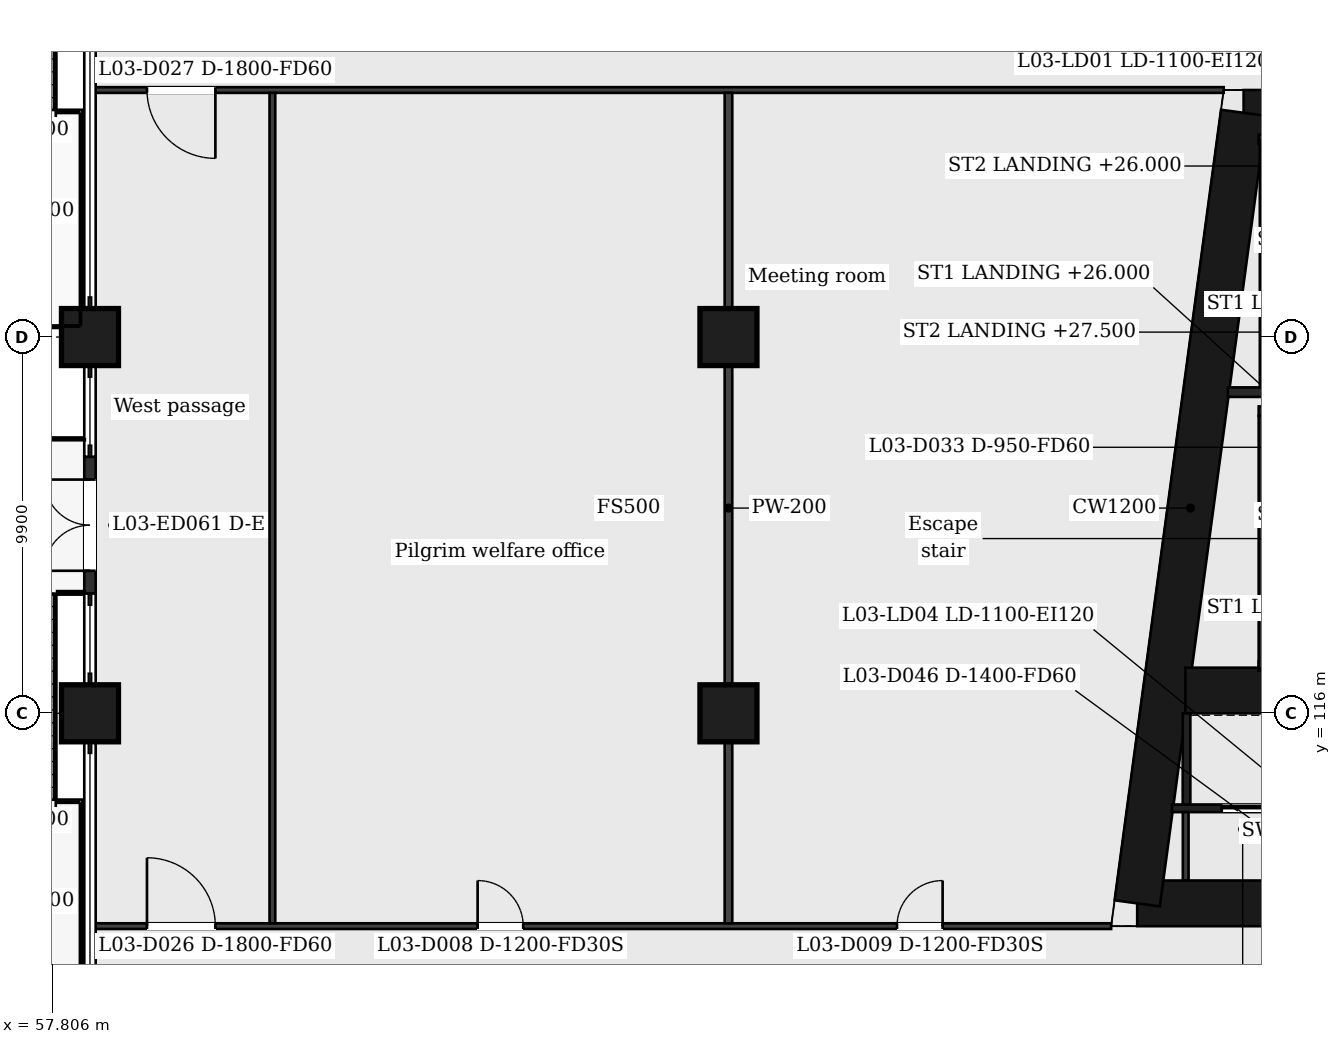
"""IFC4 building model, lengths in metres.
Left out: names, types, materials, properties, quantities, classifications, styles, units other than length and angle.
Written with IfcOpenShell. Run it as: python <this file> out.ifc"""

import sys

from ifc_helpers import new_model, si_unit, direction, frame, frame_2d, origin, origin_2d, place, context, subcontext, project, spatial, rectangle, extrude, element, fill, save


model = new_model("IFC4")
c1 = context("Model", 3, precision=1e-05, world=origin(), true_north=direction((0.0, 1.0)))
c2 = subcontext(c1, "Body", "Model", "MODEL_VIEW")
j1 = project(units=[si_unit("LENGTHUNIT", "METRE"), si_unit("PLANEANGLEUNIT", "RADIAN")], contexts=[c1])
p1 = place(None, origin())
s1 = spatial("IfcSite", under=j1, at=p1, CompositionType="ELEMENT")
p2 = place(p1, origin())
s2 = spatial("IfcBuilding", under=s1, at=p2, CompositionType="ELEMENT")
p3 = place(p2, frame((0.0, 0.0, 23.0)))
s3 = spatial("IfcBuildingStorey", under=s2, at=p3, CompositionType="ELEMENT", Elevation=23.0)
p4 = place(p3, frame((89.156, 131.8, 0.0), z_axis=(0.0, 0.0, 1.0), x_axis=(1.0, 0.0, 0.0)))
e1 = element("IfcWall", 1, at=p4, inside=s3, PredefinedType="SHEAR", context=c2, shape_type="SweptSolid", body=[
    extrude(rectangle(XDim=11.044, YDim=1.2, at=frame_2d((5.522, 0.0))), origin(), (0.0, 0.0, 1.0), 6.0),
])
p5 = place(p4, frame((6.458, 0.0, 0.0)))
e2 = element("IfcOpeningElement", 2, at=p5, cuts=e1, PredefinedType="OPENING", context=c2, shape_type="SweptSolid", body=[
    extrude(rectangle(XDim=1.2, YDim=2.1, at=frame_2d((0.6, 1.05))), frame((0.0, 0.61, 0.0), z_axis=(0.0, -1.0, 0.0), x_axis=(1.0, 0.0, 0.0)), (0.0, 0.0, 1.0), 1.22),
])
p6 = place(p3, frame((100.2, 111.0, 0.0), z_axis=(0.0, 0.0, 1.0), x_axis=(-1.0, 0.0, 0.0)))
e3 = element("IfcWall", 3, at=p6, inside=s3, PredefinedType="SHEAR", context=c2, shape_type="SweptSolid", body=[
    extrude(rectangle(XDim=13.844, YDim=1.2, at=frame_2d((6.922, 0.0))), origin(), (0.0, 0.0, 1.0), 6.0),
])
p7 = place(p6, frame((5.694, 0.0, 0.0)))
e4 = element("IfcOpeningElement", 4, at=p7, cuts=e3, PredefinedType="OPENING", context=c2, shape_type="SweptSolid", body=[
    extrude(rectangle(XDim=1.4, YDim=2.1, at=frame_2d((0.7, 1.05))), frame((0.0, 0.61, 0.0), z_axis=(0.0, -1.0, 0.0), x_axis=(1.0, 0.0, 0.0)), (0.0, 0.0, 1.0), 1.22),
])
p8 = place(p3, frame((86.355, 111.0, 0.0), z_axis=(0.0, 0.0, 1.0), x_axis=(0.133413989637, 0.99106039542, 0.0)))
e5 = element("IfcWall", 5, at=p8, inside=s3, PredefinedType="SHEAR", context=c2, shape_type="SweptSolid", body=[
    extrude(rectangle(XDim=20.988, YDim=1.2, at=frame_2d((10.494, 0.0))), origin(), (0.0, 0.0, 1.0), 6.0),
])
p9 = place(p3, frame((87.623, 116.6, 0.0), z_axis=(0.0, 0.0, 1.0), x_axis=(1.0, 0.0, 0.0)))
e6 = element("IfcWall", 6, at=p9, inside=s3, PredefinedType="SHEAR", context=c2, shape_type="SweptSolid", body=[
    extrude(rectangle(XDim=5.077, YDim=1.2, at=frame_2d((2.539, 0.0))), origin(), (0.0, 0.0, 1.0), 6.0),
])
for number, where, z_axis, x_axis in (
    (7, (58.8, 116.0, 0.0), (0.0, 0.0, 1.0), (1.0, 0.0, 0.0)),
    (8, (75.6, 116.0, 0.0), (0.0, 0.0, 1.0), (1.0, 0.0, 0.0)),
    (9, (58.8, 125.9, 0.0), (0.0, 0.0, 1.0), (1.0, 0.0, 0.0)),
    (10, (75.6, 125.9, 0.0), (0.0, 0.0, 1.0), (1.0, 0.0, 0.0)),
):
    element("IfcColumn", number, at=place(p3, frame(where, z_axis=z_axis, x_axis=x_axis)), inside=s3, PredefinedType="COLUMN", context=c2, shape_type="SweptSolid", body=[
        extrude(rectangle(XDim=1.5, YDim=1.5, at=origin_2d()), origin(), (0.0, 0.0, 1.0), 6.0),
    ])
p10 = place(p3, frame((58.8, 119.15, 0.0), z_axis=(0.0, 0.0, 1.0), x_axis=(0.0, 1.0, 0.0)))
e11 = element("IfcWall", 11, at=p10, inside=s3, PredefinedType="SOLIDWALL", context=c2, shape_type="SweptSolid", body=[
    extrude(rectangle(XDim=3.6, YDim=0.3, at=frame_2d((1.8, 0.0))), origin(), (0.0, 0.0, 1.0), 5.1),
])
p11 = place(p10, frame((0.6, 0.0, 0.0)))
e12 = element("IfcOpeningElement", 12, at=p11, cuts=e11, PredefinedType="OPENING", context=c2, shape_type="SweptSolid", body=[
    extrude(rectangle(XDim=2.4, YDim=2.4, at=frame_2d((1.2, 1.2))), frame((0.0, 0.16, 0.0), z_axis=(0.0, -1.0, 0.0), x_axis=(1.0, 0.0, 0.0)), (0.0, 0.0, 1.0), 0.32),
])
p12 = place(p3, frame((58.85, 110.4, 0.0), z_axis=(0.0, 0.0, 1.0), x_axis=(1.0, 0.0, 0.0)))
e13 = element("IfcWall", 13, at=p12, inside=s3, PredefinedType="PARTITIONING", context=c2, shape_type="SweptSolid", body=[
    extrude(rectangle(XDim=26.819, YDim=0.15, at=frame_2d((13.409, 0.0))), origin(), (0.0, 0.0, 1.0), 5.5),
])
p13 = place(p12, frame((10.15, 0.0, 0.0)))
e14 = element("IfcOpeningElement", 14, at=p13, cuts=e13, PredefinedType="OPENING", context=c2, shape_type="SweptSolid", body=[
    extrude(rectangle(XDim=1.2, YDim=2.1, at=frame_2d((0.6, 1.05))), frame((0.0, 0.085, 0.0), z_axis=(0.0, -1.0, 0.0), x_axis=(1.0, 0.0, 0.0)), (0.0, 0.0, 1.0), 0.17),
])
p14 = place(p12, frame((21.185, 0.0, 0.0)))
e15 = element("IfcOpeningElement", 15, at=p14, cuts=e13, PredefinedType="OPENING", context=c2, shape_type="SweptSolid", body=[
    extrude(rectangle(XDim=1.2, YDim=2.1, at=frame_2d((0.6, 1.05))), frame((0.0, 0.085, 0.0), z_axis=(0.0, -1.0, 0.0), x_axis=(1.0, 0.0, 0.0)), (0.0, 0.0, 1.0), 0.17),
])
p15 = place(p12, frame((1.45, 0.0, 0.0)))
e16 = element("IfcOpeningElement", 16, at=p15, cuts=e13, PredefinedType="OPENING", context=c2, shape_type="SweptSolid", body=[
    extrude(rectangle(XDim=1.8, YDim=2.1, at=frame_2d((0.9, 1.05))), frame((0.0, 0.085, 0.0), z_axis=(0.0, -1.0, 0.0), x_axis=(1.0, 0.0, 0.0)), (0.0, 0.0, 1.0), 0.17),
])
p16 = place(p3, frame((87.267, 113.5, 0.0), z_axis=(0.0, 0.0, 1.0), x_axis=(1.0, 0.0, 0.0)))
e17 = element("IfcWall", 17, at=p16, inside=s3, PredefinedType="PARTITIONING", context=c2, shape_type="SweptSolid", body=[
    extrude(rectangle(XDim=5.66, YDim=0.2, at=frame_2d((2.83, 0.0))), origin(), (0.0, 0.0, 1.0), 5.5),
])
p17 = place(p16, frame((1.312, 0.0, 0.0)))
e18 = element("IfcOpeningElement", 18, at=p17, cuts=e17, PredefinedType="OPENING", context=c2, shape_type="SweptSolid", body=[
    extrude(rectangle(XDim=1.1, YDim=2.1, at=frame_2d((0.55, 1.05))), frame((0.0, 0.11, 0.0), z_axis=(0.0, -1.0, 0.0), x_axis=(1.0, 0.0, 0.0)), (0.0, 0.0, 1.0), 0.22),
])
p18 = place(p16, frame((3.791, 0.0, 0.0)))
e19 = element("IfcOpeningElement", 19, at=p18, cuts=e17, PredefinedType="OPENING", context=c2, shape_type="SweptSolid", body=[
    extrude(rectangle(XDim=1.1, YDim=2.1, at=frame_2d((0.55, 1.05))), frame((0.0, 0.11, 0.0), z_axis=(0.0, -1.0, 0.0), x_axis=(1.0, 0.0, 0.0)), (0.0, 0.0, 1.0), 0.22),
])
for number, where, z_axis, x_axis in (
    (20, (89.552, 117.245, 0.0), (0.0, 0.0, 1.0), (1.0, 0.0, 0.0)),
    (21, (89.552, 123.95, 0.0), (0.0, 0.0, 1.0), (1.0, 0.0, 0.0)),
):
    element("IfcWall", number, at=place(p3, frame(where, z_axis=z_axis, x_axis=x_axis)), inside=s3, PredefinedType="PARTITIONING", context=c2, shape_type="SweptSolid", body=[
        extrude(rectangle(XDim=3.4, YDim=0.25, at=frame_2d((1.7, 0.0))), origin(), (0.0, 0.0, 1.0), 5.5),
    ])
p19 = place(p3, frame((88.741, 124.45, 0.0), z_axis=(0.0, 0.0, 1.0), x_axis=(1.0, 0.0, 0.0)))
e22 = element("IfcWall", 22, at=p19, inside=s3, PredefinedType="PARTITIONING", context=c2, shape_type="SweptSolid", body=[
    extrude(rectangle(XDim=4.21, YDim=0.25, at=frame_2d((2.105, 0.0))), origin(), (0.0, 0.0, 1.0), 5.5),
])
p20 = place(p3, frame((89.552, 131.101, 0.0), z_axis=(0.0, 0.0, 1.0), x_axis=(1.0, 0.0, 0.0)))
e23 = element("IfcWall", 23, at=p20, inside=s3, PredefinedType="PARTITIONING", context=c2, shape_type="SweptSolid", body=[
    extrude(rectangle(XDim=3.4, YDim=0.25, at=frame_2d((1.7, 0.0))), origin(), (0.0, 0.0, 1.0), 5.5),
])
p21 = place(p3, frame((58.85, 132.4, 0.0), z_axis=(0.0, 0.0, 1.0), x_axis=(1.0, 0.0, 0.0)))
e24 = element("IfcWall", 24, at=p21, inside=s3, PredefinedType="PARTITIONING", context=c2, shape_type="SweptSolid", body=[
    extrude(rectangle(XDim=29.781, YDim=0.15, at=frame_2d((14.891, 0.0))), origin(), (0.0, 0.0, 1.0), 5.5),
])
p22 = place(p21, frame((1.45, 0.0, 0.0)))
e25 = element("IfcOpeningElement", 25, at=p22, cuts=e24, PredefinedType="OPENING", context=c2, shape_type="SweptSolid", body=[
    extrude(rectangle(XDim=1.8, YDim=2.1, at=frame_2d((0.9, 1.05))), frame((0.0, 0.085, 0.0), z_axis=(0.0, -1.0, 0.0), x_axis=(1.0, 0.0, 0.0)), (0.0, 0.0, 1.0), 0.17),
])
p23 = place(p3, frame((63.6, 110.475, 0.0), z_axis=(0.0, 0.0, 1.0), x_axis=(0.0, 1.0, 0.0)))
e26 = element("IfcWall", 26, at=p23, inside=s3, PredefinedType="PARTITIONING", context=c2, shape_type="SweptSolid", body=[
    extrude(rectangle(XDim=21.85, YDim=0.15, at=frame_2d((10.925, 0.0))), origin(), (0.0, 0.0, 1.0), 5.5),
])
p24 = place(p3, frame((75.6, 110.475, 0.0), z_axis=(0.0, 0.0, 1.0), x_axis=(0.0, 1.0, 0.0)))
e27 = element("IfcWall", 27, at=p24, inside=s3, PredefinedType="PARTITIONING", context=c2, shape_type="SweptSolid", body=[
    extrude(rectangle(XDim=21.85, YDim=0.2, at=frame_2d((10.925, 0.0))), origin(), (0.0, 0.0, 1.0), 5.1),
])
p25 = place(p3, frame((87.653, 113.6, 0.0), z_axis=(0.0, 0.0, 1.0), x_axis=(0.0, 1.0, 0.0)))
e28 = element("IfcWall", 28, at=p25, inside=s3, PredefinedType="PARTITIONING", context=c2, shape_type="SweptSolid", body=[
    extrude(rectangle(XDim=2.4, YDim=0.2, at=frame_2d((1.2, 0.0))), origin(), (0.0, 0.0, 1.0), 5.5),
])
p26 = place(p3, frame((87.631, 111.6, 0.0), z_axis=(0.0, 0.0, 1.0), x_axis=(0.0, 1.0, 0.0)))
e29 = element("IfcWall", 29, at=p26, inside=s3, PredefinedType="PARTITIONING", context=c2, shape_type="SweptSolid", body=[
    extrude(rectangle(XDim=1.8, YDim=0.15, at=frame_2d((0.9, 0.0))), origin(), (0.0, 0.0, 1.0), 5.5),
])
p27 = place(p3, frame((89.677, 117.17, 0.0), z_axis=(0.0, 0.0, 1.0), x_axis=(0.0, 1.0, 0.0)))
e30 = element("IfcWall", 30, at=p27, inside=s3, PredefinedType="PARTITIONING", context=c2, shape_type="SweptSolid", body=[
    extrude(rectangle(XDim=6.655, YDim=0.25, at=frame_2d((3.328, 0.0))), origin(), (0.0, 0.0, 1.0), 5.5),
])
p28 = place(p3, frame((89.707, 124.575, 0.0), z_axis=(0.0, 0.0, 1.0), x_axis=(0.0, 1.0, 0.0)))
e31 = element("IfcWall", 31, at=p28, inside=s3, PredefinedType="PARTITIONING", context=c2, shape_type="SweptSolid", body=[
    extrude(rectangle(XDim=6.5, YDim=0.25, at=frame_2d((3.25, 0.0))), origin(), (0.0, 0.0, 1.0), 5.5),
])
p29 = place(p11, origin())
e32 = element("IfcDoor", 32, at=p29, inside=s3, OperationType="DOUBLE_DOOR_DOUBLE_SWING", PredefinedType="DOOR", context=c2, shape_type="SweptSolid", body=[
    extrude(rectangle(XDim=2.4, YDim=2.4, at=frame_2d((1.2, 1.2))), frame((0.0, 0.025, 0.0), z_axis=(0.0, -1.0, 0.0), x_axis=(1.0, 0.0, 0.0)), (0.0, 0.0, 1.0), 0.05),
])
fill(e12, e32)
p30 = place(p13, origin())
e33 = element("IfcDoor", 33, at=p30, inside=s3, OperationType="SINGLE_SWING_LEFT", PredefinedType="DOOR", context=c2, shape_type="SweptSolid", body=[
    extrude(rectangle(XDim=1.2, YDim=2.1, at=frame_2d((0.6, 1.05))), frame((0.0, 0.025, 0.0), z_axis=(0.0, -1.0, 0.0), x_axis=(1.0, 0.0, 0.0)), (0.0, 0.0, 1.0), 0.05),
])
fill(e14, e33)
p31 = place(p14, origin())
e34 = element("IfcDoor", 34, at=p31, inside=s3, OperationType="SINGLE_SWING_RIGHT", PredefinedType="DOOR", context=c2, shape_type="SweptSolid", body=[
    extrude(rectangle(XDim=1.2, YDim=2.1, at=frame_2d((0.6, 1.05))), frame((0.0, 0.025, 0.0), z_axis=(0.0, -1.0, 0.0), x_axis=(1.0, 0.0, 0.0)), (0.0, 0.0, 1.0), 0.05),
])
fill(e15, e34)
p32 = place(p15, origin())
e35 = element("IfcDoor", 35, at=p32, inside=s3, OperationType="SINGLE_SWING_LEFT", PredefinedType="DOOR", context=c2, shape_type="SweptSolid", body=[
    extrude(rectangle(XDim=1.8, YDim=2.1, at=frame_2d((0.9, 1.05))), frame((0.0, 0.025, 0.0), z_axis=(0.0, -1.0, 0.0), x_axis=(1.0, 0.0, 0.0)), (0.0, 0.0, 1.0), 0.05),
])
fill(e16, e35)
p33 = place(p22, origin())
e36 = element("IfcDoor", 36, at=p33, inside=s3, OperationType="SINGLE_SWING_RIGHT", PredefinedType="DOOR", context=c2, shape_type="SweptSolid", body=[
    extrude(rectangle(XDim=1.8, YDim=2.1, at=frame_2d((0.9, 1.05))), frame((0.0, 0.025, 0.0), z_axis=(0.0, -1.0, 0.0), x_axis=(1.0, 0.0, 0.0)), (0.0, 0.0, 1.0), 0.05),
])
fill(e25, e36)
p34 = place(p17, origin())
e37 = element("IfcDoor", 37, at=p34, inside=s3, OperationType="SLIDING_TO_LEFT", PredefinedType="DOOR", context=c2, shape_type="SweptSolid", body=[
    extrude(rectangle(XDim=1.1, YDim=2.1, at=frame_2d((0.55, 1.05))), frame((0.0, 0.025, 0.0), z_axis=(0.0, -1.0, 0.0), x_axis=(1.0, 0.0, 0.0)), (0.0, 0.0, 1.0), 0.05),
])
fill(e18, e37)
save(model, sys.argv[1])
